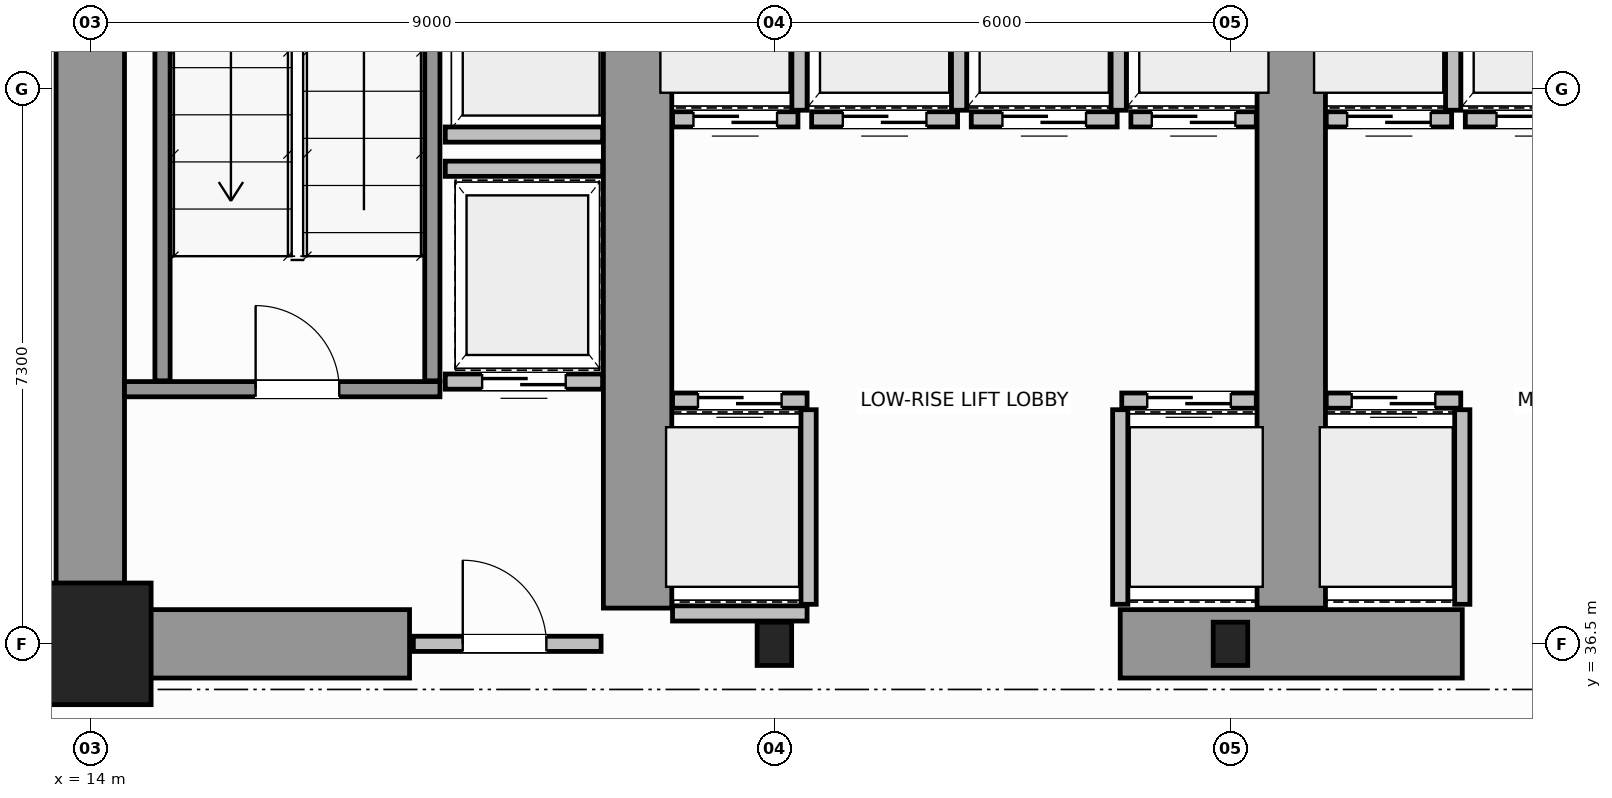
"""IFC4 building model, lengths in metres.
Left out: names, types, materials, properties, quantities, classifications, styles, units other than length and angle.
Written with IfcOpenShell. Run it as: python <this file> out.ifc"""

import sys

from ifc_helpers import new_model, si_unit, direction, frame, frame_2d, origin, origin_2d, place, context, subcontext, project, spatial, rectangle, i_section, extrude, source, transform, mapped, element, fill, save


model = new_model("IFC4")
c1 = context("Model", 3, precision=1e-05, world=origin(), true_north=direction((0.0, 1.0)))
c2 = subcontext(c1, "Body", "Model", "MODEL_VIEW")
j1 = project(units=[si_unit("LENGTHUNIT", "METRE"), si_unit("PLANEANGLEUNIT", "RADIAN")], contexts=[c1])
p1 = place(None, origin())
s1 = spatial("IfcSite", under=j1, at=p1, CompositionType="ELEMENT")
p2 = place(p1, origin())
s2 = spatial("IfcBuilding", under=s1, at=p2, CompositionType="ELEMENT")
p3 = place(p2, frame((0.0, 0.0, 14.4)))
s3 = spatial("IfcBuildingStorey", under=s2, at=p3, CompositionType="ELEMENT", Elevation=14.4)
m1 = source(origin(), c2, "Body", "SweptSolid", [
    extrude(rectangle(XDim=1.6, YDim=1.6, at=origin_2d()), origin(), (0.0, 0.0, 1.0), 4.4),
])
p4 = place(p3, frame((14.0, 36.5, 0.0), z_axis=(0.0, 0.0, 1.0), x_axis=(1.0, 0.0, 0.0)))
e1 = element("IfcColumn", 1, at=p4, inside=s3, PredefinedType="COLUMN", context=c2, shape_type="MappedRepresentation", body=[
    mapped(m1, transform((0.0, 0.0, 0.0), scale=1.0)),
])
m2 = source(origin(), c2, "Body", "SweptSolid", [
    extrude(i_section(OverallWidth=0.454, OverallDepth=0.569, WebThickness=0.078, FlangeThickness=0.08, FilletRadius=0.015, at=origin_2d()), origin(), (0.0, 0.0, 1.0), 4.4),
])
for number, where, z_axis, x_axis in (
    (2, (23.0, 36.5, 0.0), (0.0, 0.0, 1.0), (1.0, 0.0, 0.0)),
    (3, (29.0, 36.5, 0.0), (0.0, 0.0, 1.0), (1.0, 0.0, 0.0)),
):
    element("IfcColumn", number, at=place(p3, frame(where, z_axis=z_axis, x_axis=x_axis)), inside=s3, PredefinedType="COLUMN", context=c2, shape_type="MappedRepresentation", body=[
        mapped(m2, transform((0.0, 0.0, 0.0), scale=1.0)),
    ])
p5 = place(p3, frame((14.0, 36.5, 0.0), z_axis=(0.0, 0.0, 1.0), x_axis=(0.0, 1.0, 0.0)))
e4 = element("IfcWall", 4, at=p5, inside=s3, PredefinedType="SHEAR", context=c2, shape_type="SweptSolid", body=[
    extrude(rectangle(XDim=14.5, YDim=0.9, at=frame_2d((7.25, 0.0))), origin(), (0.0, 0.0, 1.0), 4.4),
])
p6 = place(p3, frame((14.47, 36.5, 0.0), z_axis=(0.0, 0.0, 1.0), x_axis=(1.0, 0.0, 0.0)))
e5 = element("IfcWall", 5, at=p6, inside=s3, PredefinedType="SHEAR", context=c2, shape_type="SweptSolid", body=[
    extrude(rectangle(XDim=3.73, YDim=0.9, at=frame_2d((1.865, 0.0))), origin(), (0.0, 0.0, 1.0), 2.92),
])
p7 = place(p3, frame((27.55, 36.5, 0.0), z_axis=(0.0, 0.0, 1.0), x_axis=(1.0, 0.0, 0.0)))
e6 = element("IfcWall", 6, at=p7, inside=s3, PredefinedType="SHEAR", context=c2, shape_type="SweptSolid", body=[
    extrude(rectangle(XDim=4.5, YDim=0.9, at=frame_2d((2.25, 0.0))), origin(), (0.0, 0.0, 1.0), 4.4),
])
for number, where, z_axis, x_axis in (
    (7, (21.2, 36.97, 0.0), (0.0, 0.0, 1.0), (0.0, 1.0, 0.0)),
    (8, (29.8, 36.97, 0.0), (0.0, 0.0, 1.0), (0.0, 1.0, 0.0)),
):
    element("IfcWall", number, at=place(p3, frame(where, z_axis=z_axis, x_axis=x_axis)), inside=s3, PredefinedType="SHEAR", context=c2, shape_type="SweptSolid", body=[
        extrude(rectangle(XDim=9.23, YDim=0.9, at=frame_2d((4.615, 0.0))), origin(), (0.0, 0.0, 1.0), 4.4),
    ])
p8 = place(p3, frame((14.45, 39.85, 0.0), z_axis=(0.0, 0.0, 1.0), x_axis=(1.0, 0.0, 0.0)))
e9 = element("IfcWall", 9, at=p8, inside=s3, PredefinedType="SOLIDWALL", context=c2, shape_type="SweptSolid", body=[
    extrude(rectangle(XDim=4.15, YDim=0.2, at=frame_2d((2.075, 0.0))), origin(), (0.0, 0.0, 1.0), 4.4),
])
p9 = place(p8, frame((1.725, 0.0, 0.0)))
e10 = element("IfcOpeningElement", 10, at=p9, cuts=e9, PredefinedType="OPENING", context=c2, shape_type="SweptSolid", body=[
    extrude(rectangle(XDim=1.1, YDim=2.15, at=frame_2d((0.55, 1.075))), frame((0.0, 0.11, 0.0), z_axis=(0.0, -1.0, 0.0), x_axis=(1.0, 0.0, 0.0)), (0.0, 0.0, 1.0), 0.22),
])
for number, where, z_axis, x_axis in (
    (11, (14.95, 39.96, 0.0), (0.0, 0.0, 1.0), (0.0, 1.0, 0.0)),
    (12, (18.5, 39.96, 0.0), (0.0, 0.0, 1.0), (0.0, 1.0, 0.0)),
):
    element("IfcWall", number, at=place(p3, frame(where, z_axis=z_axis, x_axis=x_axis)), inside=s3, PredefinedType="SOLIDWALL", context=c2, shape_type="SweptSolid", body=[
        extrude(rectangle(XDim=9.93, YDim=0.2, at=frame_2d((4.965, 0.0))), origin(), (0.0, 0.0, 1.0), 4.4),
    ])
p10 = place(p3, frame((18.25, 36.5, 0.0), z_axis=(0.0, 0.0, 1.0), x_axis=(1.0, 0.0, 0.0)))
e13 = element("IfcWall", 13, at=p10, inside=s3, PredefinedType="SOLIDWALL", context=c2, shape_type="SweptSolid", body=[
    extrude(rectangle(XDim=2.47, YDim=0.2, at=frame_2d((1.235, 0.0))), origin(), (0.0, 0.0, 1.0), 2.91),
])
p11 = place(p10, frame((0.65, 0.0, 0.0)))
e14 = element("IfcOpeningElement", 14, at=p11, cuts=e13, PredefinedType="OPENING", context=c2, shape_type="SweptSolid", body=[
    extrude(rectangle(XDim=1.1, YDim=2.15, at=frame_2d((0.55, 1.075))), frame((0.0, 0.11, 0.0), z_axis=(0.0, -1.0, 0.0), x_axis=(1.0, 0.0, 0.0)), (0.0, 0.0, 1.0), 0.22),
])
p12 = place(p3, frame((21.66, 39.7, 0.0), z_axis=(0.0, 0.0, 1.0), x_axis=(1.0, 0.0, 0.0)))
e15 = element("IfcWall", 15, at=p12, inside=s3, PredefinedType="SOLIDWALL", context=c2, shape_type="SweptSolid", body=[
    extrude(rectangle(XDim=1.77, YDim=0.2, at=frame_2d((0.885, 0.0))), origin(), (0.0, 0.0, 1.0), 4.12),
])
p13 = place(p12, frame((0.335, 0.0, 0.0)))
e16 = element("IfcOpeningElement", 16, at=p13, cuts=e15, PredefinedType="OPENING", context=c2, shape_type="SweptSolid", body=[
    extrude(rectangle(XDim=1.1, YDim=2.15, at=frame_2d((0.55, 1.075))), frame((0.0, 0.11, 0.0), z_axis=(0.0, -1.0, 0.0), x_axis=(1.0, 0.0, 0.0)), (0.0, 0.0, 1.0), 0.22),
])
p14 = place(p3, frame((21.66, 36.9, 0.0), z_axis=(0.0, 0.0, 1.0), x_axis=(1.0, 0.0, 0.0)))
e17 = element("IfcWall", 17, at=p14, inside=s3, PredefinedType="SOLIDWALL", context=c2, shape_type="SweptSolid", body=[
    extrude(rectangle(XDim=1.77, YDim=0.2, at=frame_2d((0.885, 0.0))), origin(), (0.0, 0.0, 1.0), 2.91),
])
p15 = place(p3, frame((23.45, 37.02, 0.0), z_axis=(0.0, 0.0, 1.0), x_axis=(0.0, 1.0, 0.0)))
e18 = element("IfcWall", 18, at=p15, inside=s3, PredefinedType="SOLIDWALL", context=c2, shape_type="SweptSolid", body=[
    extrude(rectangle(XDim=2.56, YDim=0.2, at=frame_2d((1.28, 0.0))), origin(), (0.0, 0.0, 1.0), 2.91),
])
p16 = place(p3, frame((27.57, 39.7, 0.0), z_axis=(0.0, 0.0, 1.0), x_axis=(1.0, 0.0, 0.0)))
e19 = element("IfcWall", 19, at=p16, inside=s3, PredefinedType="SOLIDWALL", context=c2, shape_type="SweptSolid", body=[
    extrude(rectangle(XDim=1.77, YDim=0.2, at=frame_2d((0.885, 0.0))), origin(), (0.0, 0.0, 1.0), 4.12),
])
p17 = place(p16, frame((0.335, 0.0, 0.0)))
e20 = element("IfcOpeningElement", 20, at=p17, cuts=e19, PredefinedType="OPENING", context=c2, shape_type="SweptSolid", body=[
    extrude(rectangle(XDim=1.1, YDim=2.15, at=frame_2d((0.55, 1.075))), frame((0.0, 0.11, 0.0), z_axis=(0.0, -1.0, 0.0), x_axis=(1.0, 0.0, 0.0)), (0.0, 0.0, 1.0), 0.22),
])
p18 = place(p3, frame((27.55, 37.02, 0.0), z_axis=(0.0, 0.0, 1.0), x_axis=(0.0, 1.0, 0.0)))
e21 = element("IfcWall", 21, at=p18, inside=s3, PredefinedType="SOLIDWALL", context=c2, shape_type="SweptSolid", body=[
    extrude(rectangle(XDim=2.56, YDim=0.2, at=frame_2d((1.28, 0.0))), origin(), (0.0, 0.0, 1.0), 4.12),
])
p19 = place(p3, frame((21.66, 43.4, 0.0), z_axis=(0.0, 0.0, 1.0), x_axis=(1.0, 0.0, 0.0)))
e22 = element("IfcWall", 22, at=p19, inside=s3, PredefinedType="SOLIDWALL", context=c2, shape_type="SweptSolid", body=[
    extrude(rectangle(XDim=1.65, YDim=0.2, at=frame_2d((0.825, 0.0))), origin(), (0.0, 0.0, 1.0), 4.12),
])
p20 = place(p19, frame((0.275, 0.0, 0.0)))
e23 = element("IfcOpeningElement", 23, at=p20, cuts=e22, PredefinedType="OPENING", context=c2, shape_type="SweptSolid", body=[
    extrude(rectangle(XDim=1.1, YDim=2.15, at=frame_2d((0.55, 1.075))), frame((0.0, 0.11, 0.0), z_axis=(0.0, -1.0, 0.0), x_axis=(1.0, 0.0, 0.0)), (0.0, 0.0, 1.0), 0.22),
])
p21 = place(p3, frame((23.33, 43.52, 0.0), z_axis=(0.0, 0.0, 1.0), x_axis=(0.0, 1.0, 0.0)))
e24 = element("IfcWall", 24, at=p21, inside=s3, PredefinedType="SOLIDWALL", context=c2, shape_type="SweptSolid", body=[
    extrude(rectangle(XDim=2.56, YDim=0.2, at=frame_2d((1.28, 0.0))), origin(), (0.0, 0.0, 1.0), 2.91),
])
p22 = place(p3, frame((23.49, 43.4, 0.0), z_axis=(0.0, 0.0, 1.0), x_axis=(1.0, 0.0, 0.0)))
e25 = element("IfcWall", 25, at=p22, inside=s3, PredefinedType="SOLIDWALL", context=c2, shape_type="SweptSolid", body=[
    extrude(rectangle(XDim=1.92, YDim=0.2, at=frame_2d((0.96, 0.0))), origin(), (0.0, 0.0, 1.0), 4.12),
])
p23 = place(p22, frame((0.41, 0.0, 0.0)))
e26 = element("IfcOpeningElement", 26, at=p23, cuts=e25, PredefinedType="OPENING", context=c2, shape_type="SweptSolid", body=[
    extrude(rectangle(XDim=1.1, YDim=2.15, at=frame_2d((0.55, 1.075))), frame((0.0, 0.11, 0.0), z_axis=(0.0, -1.0, 0.0), x_axis=(1.0, 0.0, 0.0)), (0.0, 0.0, 1.0), 0.22),
])
p24 = place(p3, frame((25.43, 43.52, 0.0), z_axis=(0.0, 0.0, 1.0), x_axis=(0.0, 1.0, 0.0)))
e27 = element("IfcWall", 27, at=p24, inside=s3, PredefinedType="SOLIDWALL", context=c2, shape_type="SweptSolid", body=[
    extrude(rectangle(XDim=2.56, YDim=0.2, at=frame_2d((1.28, 0.0))), origin(), (0.0, 0.0, 1.0), 4.12),
])
p25 = place(p3, frame((25.59, 43.4, 0.0), z_axis=(0.0, 0.0, 1.0), x_axis=(1.0, 0.0, 0.0)))
e28 = element("IfcWall", 28, at=p25, inside=s3, PredefinedType="SOLIDWALL", context=c2, shape_type="SweptSolid", body=[
    extrude(rectangle(XDim=1.92, YDim=0.2, at=frame_2d((0.96, 0.0))), origin(), (0.0, 0.0, 1.0), 4.12),
])
p26 = place(p25, frame((0.41, 0.0, 0.0)))
e29 = element("IfcOpeningElement", 29, at=p26, cuts=e28, PredefinedType="OPENING", context=c2, shape_type="SweptSolid", body=[
    extrude(rectangle(XDim=1.1, YDim=2.15, at=frame_2d((0.55, 1.075))), frame((0.0, 0.11, 0.0), z_axis=(0.0, -1.0, 0.0), x_axis=(1.0, 0.0, 0.0)), (0.0, 0.0, 1.0), 0.22),
])
p27 = place(p3, frame((27.53, 43.52, 0.0), z_axis=(0.0, 0.0, 1.0), x_axis=(0.0, 1.0, 0.0)))
e30 = element("IfcWall", 30, at=p27, inside=s3, PredefinedType="SOLIDWALL", context=c2, shape_type="SweptSolid", body=[
    extrude(rectangle(XDim=2.56, YDim=0.2, at=frame_2d((1.28, 0.0))), origin(), (0.0, 0.0, 1.0), 4.12),
])
p28 = place(p3, frame((27.69, 43.4, 0.0), z_axis=(0.0, 0.0, 1.0), x_axis=(1.0, 0.0, 0.0)))
e31 = element("IfcWall", 31, at=p28, inside=s3, PredefinedType="SOLIDWALL", context=c2, shape_type="SweptSolid", body=[
    extrude(rectangle(XDim=1.65, YDim=0.2, at=frame_2d((0.825, 0.0))), origin(), (0.0, 0.0, 1.0), 4.12),
])
p29 = place(p28, frame((0.275, 0.0, 0.0)))
e32 = element("IfcOpeningElement", 32, at=p29, cuts=e31, PredefinedType="OPENING", context=c2, shape_type="SweptSolid", body=[
    extrude(rectangle(XDim=1.1, YDim=2.15, at=frame_2d((0.55, 1.075))), frame((0.0, 0.11, 0.0), z_axis=(0.0, -1.0, 0.0), x_axis=(1.0, 0.0, 0.0)), (0.0, 0.0, 1.0), 0.22),
])
p30 = place(p3, frame((30.26, 39.7, 0.0), z_axis=(0.0, 0.0, 1.0), x_axis=(1.0, 0.0, 0.0)))
e33 = element("IfcWall", 33, at=p30, inside=s3, PredefinedType="SOLIDWALL", context=c2, shape_type="SweptSolid", body=[
    extrude(rectangle(XDim=1.77, YDim=0.2, at=frame_2d((0.885, 0.0))), origin(), (0.0, 0.0, 1.0), 4.12),
])
p31 = place(p30, frame((0.335, 0.0, 0.0)))
e34 = element("IfcOpeningElement", 34, at=p31, cuts=e33, PredefinedType="OPENING", context=c2, shape_type="SweptSolid", body=[
    extrude(rectangle(XDim=1.1, YDim=2.15, at=frame_2d((0.55, 1.075))), frame((0.0, 0.11, 0.0), z_axis=(0.0, -1.0, 0.0), x_axis=(1.0, 0.0, 0.0)), (0.0, 0.0, 1.0), 0.22),
])
p32 = place(p3, frame((32.05, 37.02, 0.0), z_axis=(0.0, 0.0, 1.0), x_axis=(0.0, 1.0, 0.0)))
e35 = element("IfcWall", 35, at=p32, inside=s3, PredefinedType="SOLIDWALL", context=c2, shape_type="SweptSolid", body=[
    extrude(rectangle(XDim=2.56, YDim=0.2, at=frame_2d((1.28, 0.0))), origin(), (0.0, 0.0, 1.0), 4.12),
])
p33 = place(p3, frame((30.26, 43.4, 0.0), z_axis=(0.0, 0.0, 1.0), x_axis=(1.0, 0.0, 0.0)))
e36 = element("IfcWall", 36, at=p33, inside=s3, PredefinedType="SOLIDWALL", context=c2, shape_type="SweptSolid", body=[
    extrude(rectangle(XDim=1.65, YDim=0.2, at=frame_2d((0.825, 0.0))), origin(), (0.0, 0.0, 1.0), 4.12),
])
p34 = place(p33, frame((0.275, 0.0, 0.0)))
e37 = element("IfcOpeningElement", 37, at=p34, cuts=e36, PredefinedType="OPENING", context=c2, shape_type="SweptSolid", body=[
    extrude(rectangle(XDim=1.1, YDim=2.15, at=frame_2d((0.55, 1.075))), frame((0.0, 0.11, 0.0), z_axis=(0.0, -1.0, 0.0), x_axis=(1.0, 0.0, 0.0)), (0.0, 0.0, 1.0), 0.22),
])
p35 = place(p3, frame((31.93, 43.52, 0.0), z_axis=(0.0, 0.0, 1.0), x_axis=(0.0, 1.0, 0.0)))
e38 = element("IfcWall", 38, at=p35, inside=s3, PredefinedType="SOLIDWALL", context=c2, shape_type="SweptSolid", body=[
    extrude(rectangle(XDim=2.56, YDim=0.2, at=frame_2d((1.28, 0.0))), origin(), (0.0, 0.0, 1.0), 4.12),
])
p36 = place(p3, frame((32.09, 43.4, 0.0), z_axis=(0.0, 0.0, 1.0), x_axis=(1.0, 0.0, 0.0)))
e39 = element("IfcWall", 39, at=p36, inside=s3, PredefinedType="SOLIDWALL", context=c2, shape_type="SweptSolid", body=[
    extrude(rectangle(XDim=1.92, YDim=0.2, at=frame_2d((0.96, 0.0))), origin(), (0.0, 0.0, 1.0), 4.12),
])
p37 = place(p36, frame((0.41, 0.0, 0.0)))
e40 = element("IfcOpeningElement", 40, at=p37, cuts=e39, PredefinedType="OPENING", context=c2, shape_type="SweptSolid", body=[
    extrude(rectangle(XDim=1.1, YDim=2.15, at=frame_2d((0.55, 1.075))), frame((0.0, 0.11, 0.0), z_axis=(0.0, -1.0, 0.0), x_axis=(1.0, 0.0, 0.0)), (0.0, 0.0, 1.0), 0.22),
])
p38 = place(p3, frame((18.67, 43.2, 0.0), z_axis=(0.0, 0.0, 1.0), x_axis=(1.0, 0.0, 0.0)))
e41 = element("IfcWall", 41, at=p38, inside=s3, PredefinedType="SOLIDWALL", context=c2, shape_type="SweptSolid", body=[
    extrude(rectangle(XDim=2.07, YDim=0.2, at=frame_2d((1.035, 0.0))), origin(), (0.0, 0.0, 1.0), 4.12),
])
p39 = place(p3, frame((18.67, 39.95, 0.0), z_axis=(0.0, 0.0, 1.0), x_axis=(1.0, 0.0, 0.0)))
e42 = element("IfcWall", 42, at=p39, inside=s3, PredefinedType="SOLIDWALL", context=c2, shape_type="SweptSolid", body=[
    extrude(rectangle(XDim=2.07, YDim=0.2, at=frame_2d((1.035, 0.0))), origin(), (0.0, 0.0, 1.0), 4.12),
])
p40 = place(p39, frame((0.485, 0.0, 0.0)))
e43 = element("IfcOpeningElement", 43, at=p40, cuts=e42, PredefinedType="OPENING", context=c2, shape_type="SweptSolid", body=[
    extrude(rectangle(XDim=1.1, YDim=2.15, at=frame_2d((0.55, 1.075))), frame((0.0, 0.11, 0.0), z_axis=(0.0, -1.0, 0.0), x_axis=(1.0, 0.0, 0.0)), (0.0, 0.0, 1.0), 0.22),
])
p41 = place(p3, frame((18.67, 42.75, 0.0), z_axis=(0.0, 0.0, 1.0), x_axis=(1.0, 0.0, 0.0)))
e44 = element("IfcWall", 44, at=p41, inside=s3, PredefinedType="SOLIDWALL", context=c2, shape_type="SweptSolid", body=[
    extrude(rectangle(XDim=2.07, YDim=0.2, at=frame_2d((1.035, 0.0))), origin(), (0.0, 0.0, 1.0), 4.12),
])
m3 = source(origin(), c2, "Body", "SweptSolid", [
    extrude(rectangle(XDim=1.1, YDim=2.15, at=frame_2d((0.55, 1.075))), frame((0.0, 0.025, 0.0), z_axis=(0.0, -1.0, 0.0), x_axis=(1.0, 0.0, 0.0)), (0.0, 0.0, 1.0), 0.05),
])
p42 = place(p9, origin())
e45 = element("IfcDoor", 45, at=p42, inside=s3, OperationType="SINGLE_SWING_LEFT", PredefinedType="DOOR", context=c2, shape_type="MappedRepresentation", body=[
    mapped(m3, transform((0.0, 0.0, 0.0), scale=1.0)),
])
fill(e10, e45)
p43 = place(p11, origin())
e46 = element("IfcDoor", 46, at=p43, inside=s3, OperationType="SINGLE_SWING_RIGHT", PredefinedType="DOOR", context=c2, shape_type="MappedRepresentation", body=[
    mapped(m3, transform((0.0, 0.0, 0.0), scale=1.0)),
])
fill(e14, e46)
p44 = place(p13, origin())
e47 = element("IfcDoor", 47, at=p44, inside=s3, OperationType="DOUBLE_DOOR_SLIDING", PredefinedType="DOOR", context=c2, shape_type="MappedRepresentation", body=[
    mapped(m3, transform((0.0, 0.0, 0.0), scale=1.0)),
])
fill(e16, e47)
p45 = place(p17, origin())
e48 = element("IfcDoor", 48, at=p45, inside=s3, OperationType="DOUBLE_DOOR_SLIDING", PredefinedType="DOOR", context=c2, shape_type="MappedRepresentation", body=[
    mapped(m3, transform((0.0, 0.0, 0.0), scale=1.0)),
])
fill(e20, e48)
p46 = place(p20, origin())
e49 = element("IfcDoor", 49, at=p46, inside=s3, OperationType="DOUBLE_DOOR_SLIDING", PredefinedType="DOOR", context=c2, shape_type="MappedRepresentation", body=[
    mapped(m3, transform((0.0, 0.0, 0.0), scale=1.0)),
])
fill(e23, e49)
p47 = place(p23, origin())
e50 = element("IfcDoor", 50, at=p47, inside=s3, OperationType="DOUBLE_DOOR_SLIDING", PredefinedType="DOOR", context=c2, shape_type="MappedRepresentation", body=[
    mapped(m3, transform((0.0, 0.0, 0.0), scale=1.0)),
])
fill(e26, e50)
p48 = place(p26, origin())
e51 = element("IfcDoor", 51, at=p48, inside=s3, OperationType="DOUBLE_DOOR_SLIDING", PredefinedType="DOOR", context=c2, shape_type="MappedRepresentation", body=[
    mapped(m3, transform((0.0, 0.0, 0.0), scale=1.0)),
])
fill(e29, e51)
p49 = place(p29, origin())
e52 = element("IfcDoor", 52, at=p49, inside=s3, OperationType="DOUBLE_DOOR_SLIDING", PredefinedType="DOOR", context=c2, shape_type="MappedRepresentation", body=[
    mapped(m3, transform((0.0, 0.0, 0.0), scale=1.0)),
])
fill(e32, e52)
p50 = place(p31, origin())
e53 = element("IfcDoor", 53, at=p50, inside=s3, OperationType="DOUBLE_DOOR_SLIDING", PredefinedType="DOOR", context=c2, shape_type="MappedRepresentation", body=[
    mapped(m3, transform((0.0, 0.0, 0.0), scale=1.0)),
])
fill(e34, e53)
p51 = place(p34, origin())
e54 = element("IfcDoor", 54, at=p51, inside=s3, OperationType="DOUBLE_DOOR_SLIDING", PredefinedType="DOOR", context=c2, shape_type="MappedRepresentation", body=[
    mapped(m3, transform((0.0, 0.0, 0.0), scale=1.0)),
])
fill(e37, e54)
p52 = place(p37, origin())
e55 = element("IfcDoor", 55, at=p52, inside=s3, OperationType="DOUBLE_DOOR_SLIDING", PredefinedType="DOOR", context=c2, shape_type="MappedRepresentation", body=[
    mapped(m3, transform((0.0, 0.0, 0.0), scale=1.0)),
])
fill(e40, e55)
p53 = place(p40, origin())
e56 = element("IfcDoor", 56, at=p53, inside=s3, OperationType="DOUBLE_DOOR_SLIDING", PredefinedType="DOOR", context=c2, shape_type="MappedRepresentation", body=[
    mapped(m3, transform((0.0, 0.0, 0.0), scale=1.0)),
])
fill(e43, e56)
save(model, sys.argv[1])
